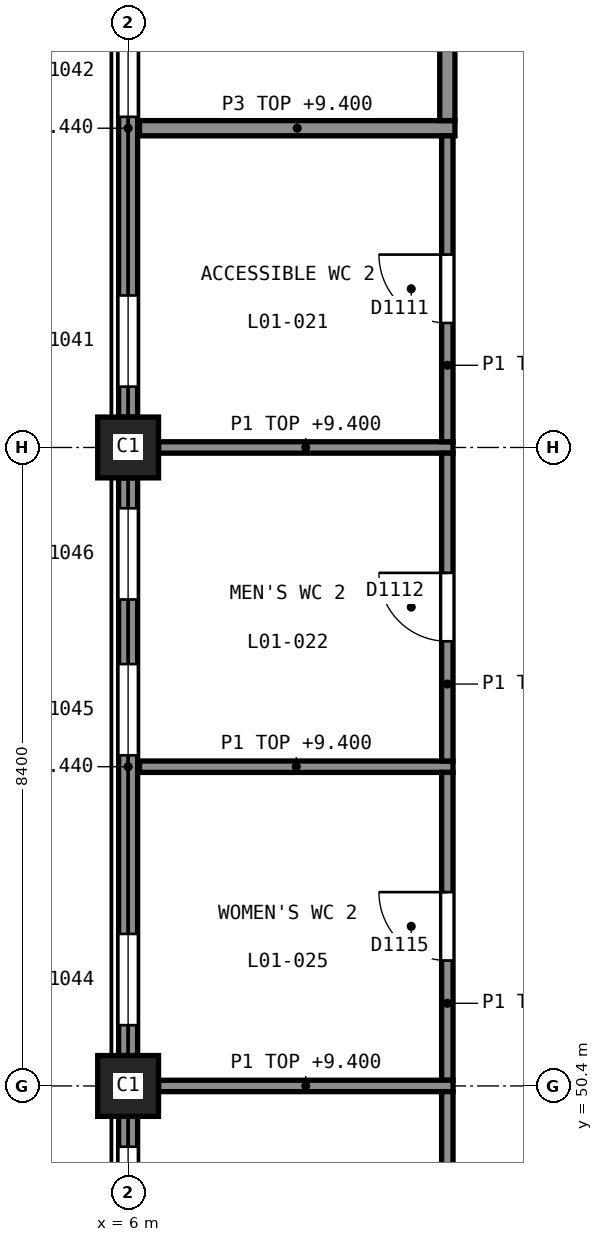
"""IFC4 building model, lengths in metres.
Left out: names, types, materials, properties, quantities, classifications, styles, units other than length and angle.
Written with IfcOpenShell. Run it as: python <this file> out.ifc"""

import sys

from ifc_helpers import new_model, si_unit, direction, frame, frame_2d, origin, origin_2d, place, context, subcontext, project, spatial, rectangle, extrude, element, fill, save


model = new_model("IFC4")
c1 = context("Model", 3, precision=1e-05, world=origin(), true_north=direction((0.0, 1.0)))
c2 = subcontext(c1, "Body", "Model", "MODEL_VIEW")
j1 = project(units=[si_unit("LENGTHUNIT", "METRE"), si_unit("PLANEANGLEUNIT", "RADIAN")], contexts=[c1])
p1 = place(None, origin())
s1 = spatial("IfcSite", under=j1, at=p1, CompositionType="ELEMENT")
p2 = place(p1, origin())
s2 = spatial("IfcBuilding", under=s1, at=p2, CompositionType="ELEMENT")
p3 = place(p2, frame((0.0, 0.0, 5.5)))
s3 = spatial("IfcBuildingStorey", under=s2, at=p3, CompositionType="ELEMENT", Elevation=5.5)
for number, where, z_axis, x_axis in (
    (1, (6.0, 50.4, 0.0), (0.0, 0.0, 1.0), (1.0, 0.0, 0.0)),
    (2, (6.0, 58.8, 0.0), (0.0, 0.0, 1.0), (1.0, 0.0, 0.0)),
):
    element("IfcColumn", number, at=place(p3, frame(where, z_axis=z_axis, x_axis=x_axis)), inside=s3, PredefinedType="COLUMN", context=c2, shape_type="SweptSolid", body=[
        extrude(rectangle(XDim=0.8, YDim=0.8, at=origin_2d()), origin(), (0.0, 0.0, 1.0), 5.0),
    ])
p4 = place(p3, frame((6.0, 59.2, 0.0), z_axis=(0.0, 0.0, 1.0), x_axis=(0.0, 1.0, 0.0)))
e3 = element("IfcWall", 3, at=p4, inside=s3, PredefinedType="SOLIDWALL", context=c2, shape_type="SweptSolid", body=[
    extrude(rectangle(XDim=7.6, YDim=0.25, at=frame_2d((3.8, 0.0))), origin(), (0.0, 0.0, 1.0), 3.94),
])
p5 = place(p4, frame((0.4, 0.0, 0.9)))
e4 = element("IfcOpeningElement", 4, at=p5, cuts=e3, PredefinedType="OPENING", context=c2, shape_type="SweptSolid", body=[
    extrude(rectangle(XDim=1.2, YDim=2.1, at=frame_2d((0.6, 1.05))), frame((0.0, 0.135, 0.0), z_axis=(0.0, -1.0, 0.0), x_axis=(1.0, 0.0, 0.0)), (0.0, 0.0, 1.0), 0.27),
])
p6 = place(p4, frame((3.95, 0.0, 0.9)))
e5 = element("IfcOpeningElement", 5, at=p6, cuts=e3, PredefinedType="OPENING", context=c2, shape_type="SweptSolid", body=[
    extrude(rectangle(XDim=1.2, YDim=2.1, at=frame_2d((0.6, 1.05))), frame((0.0, 0.135, 0.0), z_axis=(0.0, -1.0, 0.0), x_axis=(1.0, 0.0, 0.0)), (0.0, 0.0, 1.0), 0.27),
])
p7 = place(p4, frame((6.0, 0.0, 0.9)))
e6 = element("IfcOpeningElement", 6, at=p7, cuts=e3, PredefinedType="OPENING", context=c2, shape_type="SweptSolid", body=[
    extrude(rectangle(XDim=1.2, YDim=2.1, at=frame_2d((0.6, 1.05))), frame((0.0, 0.135, 0.0), z_axis=(0.0, -1.0, 0.0), x_axis=(1.0, 0.0, 0.0)), (0.0, 0.0, 1.0), 0.27),
])
p8 = place(p3, frame((6.0, 50.8, 0.0), z_axis=(0.0, 0.0, 1.0), x_axis=(0.0, 1.0, 0.0)))
e7 = element("IfcWall", 7, at=p8, inside=s3, PredefinedType="SOLIDWALL", context=c2, shape_type="SweptSolid", body=[
    extrude(rectangle(XDim=7.6, YDim=0.25, at=frame_2d((3.8, 0.0))), origin(), (0.0, 0.0, 1.0), 3.94),
])
p9 = place(p8, frame((0.4, 0.0, 0.9)))
e8 = element("IfcOpeningElement", 8, at=p9, cuts=e7, PredefinedType="OPENING", context=c2, shape_type="SweptSolid", body=[
    extrude(rectangle(XDim=1.2, YDim=2.1, at=frame_2d((0.6, 1.05))), frame((0.0, 0.135, 0.0), z_axis=(0.0, -1.0, 0.0), x_axis=(1.0, 0.0, 0.0)), (0.0, 0.0, 1.0), 0.27),
])
p10 = place(p8, frame((3.95, 0.0, 0.9)))
e9 = element("IfcOpeningElement", 9, at=p10, cuts=e7, PredefinedType="OPENING", context=c2, shape_type="SweptSolid", body=[
    extrude(rectangle(XDim=1.2, YDim=2.1, at=frame_2d((0.6, 1.05))), frame((0.0, 0.135, 0.0), z_axis=(0.0, -1.0, 0.0), x_axis=(1.0, 0.0, 0.0)), (0.0, 0.0, 1.0), 0.27),
])
p11 = place(p8, frame((6.0, 0.0, 0.9)))
e10 = element("IfcOpeningElement", 10, at=p11, cuts=e7, PredefinedType="OPENING", context=c2, shape_type="SweptSolid", body=[
    extrude(rectangle(XDim=1.2, YDim=2.1, at=frame_2d((0.6, 1.05))), frame((0.0, 0.135, 0.0), z_axis=(0.0, -1.0, 0.0), x_axis=(1.0, 0.0, 0.0)), (0.0, 0.0, 1.0), 0.27),
])
p12 = place(p3, frame((6.0, 42.4, 0.0), z_axis=(0.0, 0.0, 1.0), x_axis=(0.0, 1.0, 0.0)))
e11 = element("IfcWall", 11, at=p12, inside=s3, PredefinedType="SOLIDWALL", context=c2, shape_type="SweptSolid", body=[
    extrude(rectangle(XDim=7.6, YDim=0.25, at=frame_2d((3.8, 0.0))), origin(), (0.0, 0.0, 1.0), 3.94),
])
p13 = place(p12, frame((0.4, 0.0, 0.9)))
e12 = element("IfcOpeningElement", 12, at=p13, cuts=e11, PredefinedType="OPENING", context=c2, shape_type="SweptSolid", body=[
    extrude(rectangle(XDim=1.2, YDim=2.1, at=frame_2d((0.6, 1.05))), frame((0.0, 0.135, 0.0), z_axis=(0.0, -1.0, 0.0), x_axis=(1.0, 0.0, 0.0)), (0.0, 0.0, 1.0), 0.27),
])
p14 = place(p12, frame((3.2, 0.0, 0.9)))
e13 = element("IfcOpeningElement", 13, at=p14, cuts=e11, PredefinedType="OPENING", context=c2, shape_type="SweptSolid", body=[
    extrude(rectangle(XDim=1.2, YDim=2.1, at=frame_2d((0.6, 1.05))), frame((0.0, 0.135, 0.0), z_axis=(0.0, -1.0, 0.0), x_axis=(1.0, 0.0, 0.0)), (0.0, 0.0, 1.0), 0.27),
])
p15 = place(p12, frame((6.0, 0.0, 0.9)))
e14 = element("IfcOpeningElement", 14, at=p15, cuts=e11, PredefinedType="OPENING", context=c2, shape_type="SweptSolid", body=[
    extrude(rectangle(XDim=1.2, YDim=2.1, at=frame_2d((0.6, 1.05))), frame((0.0, 0.135, 0.0), z_axis=(0.0, -1.0, 0.0), x_axis=(1.0, 0.0, 0.0)), (0.0, 0.0, 1.0), 0.27),
])
p16 = place(p3, frame((6.15, 63.0, 0.0), z_axis=(0.0, 0.0, 1.0), x_axis=(1.0, 0.0, 0.0)))
e15 = element("IfcWall", 15, at=p16, inside=s3, PredefinedType="PARTITIONING", context=c2, shape_type="SweptSolid", body=[
    extrude(rectangle(XDim=4.15, YDim=0.2, at=frame_2d((2.075, 0.0))), origin(), (0.0, 0.0, 1.0), 3.9),
])
p17 = place(p3, frame((10.2, 63.1, 0.0), z_axis=(0.0, 0.0, 1.0), x_axis=(0.0, 1.0, 0.0)))
e16 = element("IfcWall", 16, at=p17, inside=s3, PredefinedType="PARTITIONING", context=c2, shape_type="SweptSolid", body=[
    extrude(rectangle(XDim=4.1, YDim=0.2, at=frame_2d((2.05, 0.0))), origin(), (0.0, 0.0, 1.0), 3.9),
])
p18 = place(p3, frame((6.4, 58.8, 0.0), z_axis=(0.0, 0.0, 1.0), x_axis=(1.0, 0.0, 0.0)))
e17 = element("IfcWall", 17, at=p18, inside=s3, PredefinedType="PARTITIONING", context=c2, shape_type="SweptSolid", body=[
    extrude(rectangle(XDim=3.875, YDim=0.15, at=frame_2d((1.938, 0.0))), origin(), (0.0, 0.0, 1.0), 3.9),
])
p19 = place(p3, frame((10.2, 58.875, 0.0), z_axis=(0.0, 0.0, 1.0), x_axis=(0.0, 1.0, 0.0)))
e18 = element("IfcWall", 18, at=p19, inside=s3, PredefinedType="PARTITIONING", context=c2, shape_type="SweptSolid", body=[
    extrude(rectangle(XDim=4.025, YDim=0.15, at=frame_2d((2.012, 0.0))), origin(), (0.0, 0.0, 1.0), 3.9),
])
p20 = place(p19, frame((1.562, 0.0, 0.0)))
e19 = element("IfcOpeningElement", 19, at=p20, cuts=e18, PredefinedType="OPENING", context=c2, shape_type="SweptSolid", body=[
    extrude(rectangle(XDim=0.9, YDim=2.1, at=frame_2d((0.45, 1.05))), frame((0.0, 0.085, 0.0), z_axis=(0.0, -1.0, 0.0), x_axis=(1.0, 0.0, 0.0)), (0.0, 0.0, 1.0), 0.17),
])
p21 = place(p3, frame((6.15, 54.6, 0.0), z_axis=(0.0, 0.0, 1.0), x_axis=(1.0, 0.0, 0.0)))
e20 = element("IfcWall", 20, at=p21, inside=s3, PredefinedType="PARTITIONING", context=c2, shape_type="SweptSolid", body=[
    extrude(rectangle(XDim=4.125, YDim=0.15, at=frame_2d((2.062, 0.0))), origin(), (0.0, 0.0, 1.0), 3.9),
])
p22 = place(p3, frame((10.2, 54.675, 0.0), z_axis=(0.0, 0.0, 1.0), x_axis=(0.0, 1.0, 0.0)))
e21 = element("IfcWall", 21, at=p22, inside=s3, PredefinedType="PARTITIONING", context=c2, shape_type="SweptSolid", body=[
    extrude(rectangle(XDim=4.05, YDim=0.15, at=frame_2d((2.025, 0.0))), origin(), (0.0, 0.0, 1.0), 3.9),
])
p23 = place(p22, frame((1.575, 0.0, 0.0)))
e22 = element("IfcOpeningElement", 22, at=p23, cuts=e21, PredefinedType="OPENING", context=c2, shape_type="SweptSolid", body=[
    extrude(rectangle(XDim=0.9, YDim=2.1, at=frame_2d((0.45, 1.05))), frame((0.0, 0.085, 0.0), z_axis=(0.0, -1.0, 0.0), x_axis=(1.0, 0.0, 0.0)), (0.0, 0.0, 1.0), 0.17),
])
p24 = place(p3, frame((10.2, 50.475, 0.0), z_axis=(0.0, 0.0, 1.0), x_axis=(0.0, 1.0, 0.0)))
e23 = element("IfcWall", 23, at=p24, inside=s3, PredefinedType="PARTITIONING", context=c2, shape_type="SweptSolid", body=[
    extrude(rectangle(XDim=4.05, YDim=0.15, at=frame_2d((2.025, 0.0))), origin(), (0.0, 0.0, 1.0), 3.9),
])
p25 = place(p24, frame((1.575, 0.0, 0.0)))
e24 = element("IfcOpeningElement", 24, at=p25, cuts=e23, PredefinedType="OPENING", context=c2, shape_type="SweptSolid", body=[
    extrude(rectangle(XDim=0.9, YDim=2.1, at=frame_2d((0.45, 1.05))), frame((0.0, 0.085, 0.0), z_axis=(0.0, -1.0, 0.0), x_axis=(1.0, 0.0, 0.0)), (0.0, 0.0, 1.0), 0.17),
])
p26 = place(p3, frame((6.4, 50.4, 0.0), z_axis=(0.0, 0.0, 1.0), x_axis=(1.0, 0.0, 0.0)))
e25 = element("IfcWall", 25, at=p26, inside=s3, PredefinedType="PARTITIONING", context=c2, shape_type="SweptSolid", body=[
    extrude(rectangle(XDim=3.875, YDim=0.15, at=frame_2d((1.938, 0.0))), origin(), (0.0, 0.0, 1.0), 3.9),
])
p27 = place(p3, frame((10.2, 42.0, 0.0), z_axis=(0.0, 0.0, 1.0), x_axis=(0.0, 1.0, 0.0)))
e26 = element("IfcWall", 26, at=p27, inside=s3, PredefinedType="PARTITIONING", context=c2, shape_type="SweptSolid", body=[
    extrude(rectangle(XDim=8.325, YDim=0.15, at=frame_2d((4.163, 0.0))), origin(), (0.0, 0.0, 1.0), 3.9),
])
p28 = place(p5, origin())
e27 = element("IfcWindow", 27, at=p28, inside=s3, PartitioningType="SINGLE_PANEL", PredefinedType="WINDOW", context=c2, shape_type="SweptSolid", body=[
    extrude(rectangle(XDim=1.2, YDim=2.1, at=frame_2d((0.6, 1.05))), frame((0.0, -0.045, 0.0), z_axis=(0.0, -1.0, 0.0), x_axis=(1.0, 0.0, 0.0)), (0.0, 0.0, 1.0), 0.06),
])
fill(e4, e27)
p29 = place(p6, origin())
e28 = element("IfcWindow", 28, at=p29, inside=s3, PartitioningType="SINGLE_PANEL", PredefinedType="WINDOW", context=c2, shape_type="SweptSolid", body=[
    extrude(rectangle(XDim=1.2, YDim=2.1, at=frame_2d((0.6, 1.05))), frame((0.0, -0.045, 0.0), z_axis=(0.0, -1.0, 0.0), x_axis=(1.0, 0.0, 0.0)), (0.0, 0.0, 1.0), 0.06),
])
fill(e5, e28)
p30 = place(p9, origin())
e29 = element("IfcWindow", 29, at=p30, inside=s3, PartitioningType="SINGLE_PANEL", PredefinedType="WINDOW", context=c2, shape_type="SweptSolid", body=[
    extrude(rectangle(XDim=1.2, YDim=2.1, at=frame_2d((0.6, 1.05))), frame((0.0, -0.045, 0.0), z_axis=(0.0, -1.0, 0.0), x_axis=(1.0, 0.0, 0.0)), (0.0, 0.0, 1.0), 0.06),
])
fill(e8, e29)
p31 = place(p10, origin())
e30 = element("IfcWindow", 30, at=p31, inside=s3, PartitioningType="SINGLE_PANEL", PredefinedType="WINDOW", context=c2, shape_type="SweptSolid", body=[
    extrude(rectangle(XDim=1.2, YDim=2.1, at=frame_2d((0.6, 1.05))), frame((0.0, -0.045, 0.0), z_axis=(0.0, -1.0, 0.0), x_axis=(1.0, 0.0, 0.0)), (0.0, 0.0, 1.0), 0.06),
])
fill(e9, e30)
p32 = place(p11, origin())
e31 = element("IfcWindow", 31, at=p32, inside=s3, PartitioningType="SINGLE_PANEL", PredefinedType="WINDOW", context=c2, shape_type="SweptSolid", body=[
    extrude(rectangle(XDim=1.2, YDim=2.1, at=frame_2d((0.6, 1.05))), frame((0.0, -0.045, 0.0), z_axis=(0.0, -1.0, 0.0), x_axis=(1.0, 0.0, 0.0)), (0.0, 0.0, 1.0), 0.06),
])
fill(e10, e31)
p33 = place(p15, origin())
e32 = element("IfcWindow", 32, at=p33, inside=s3, PartitioningType="SINGLE_PANEL", PredefinedType="WINDOW", context=c2, shape_type="SweptSolid", body=[
    extrude(rectangle(XDim=1.2, YDim=2.1, at=frame_2d((0.6, 1.05))), frame((0.0, -0.045, 0.0), z_axis=(0.0, -1.0, 0.0), x_axis=(1.0, 0.0, 0.0)), (0.0, 0.0, 1.0), 0.06),
])
fill(e14, e32)
p34 = place(p20, origin())
e33 = element("IfcDoor", 33, at=p34, inside=s3, OperationType="SINGLE_SWING_LEFT", PredefinedType="DOOR", context=c2, shape_type="SweptSolid", body=[
    extrude(rectangle(XDim=0.9, YDim=2.1, at=frame_2d((0.45, 1.05))), frame((0.0, 0.025, 0.0), z_axis=(0.0, -1.0, 0.0), x_axis=(1.0, 0.0, 0.0)), (0.0, 0.0, 1.0), 0.05),
])
fill(e19, e33)
p35 = place(p23, origin())
e34 = element("IfcDoor", 34, at=p35, inside=s3, OperationType="SINGLE_SWING_LEFT", PredefinedType="DOOR", context=c2, shape_type="SweptSolid", body=[
    extrude(rectangle(XDim=0.9, YDim=2.1, at=frame_2d((0.45, 1.05))), frame((0.0, 0.025, 0.0), z_axis=(0.0, -1.0, 0.0), x_axis=(1.0, 0.0, 0.0)), (0.0, 0.0, 1.0), 0.05),
])
fill(e22, e34)
p36 = place(p25, origin())
e35 = element("IfcDoor", 35, at=p36, inside=s3, OperationType="SINGLE_SWING_LEFT", PredefinedType="DOOR", context=c2, shape_type="SweptSolid", body=[
    extrude(rectangle(XDim=0.9, YDim=2.1, at=frame_2d((0.45, 1.05))), frame((0.0, 0.025, 0.0), z_axis=(0.0, -1.0, 0.0), x_axis=(1.0, 0.0, 0.0)), (0.0, 0.0, 1.0), 0.05),
])
fill(e24, e35)
save(model, sys.argv[1])
